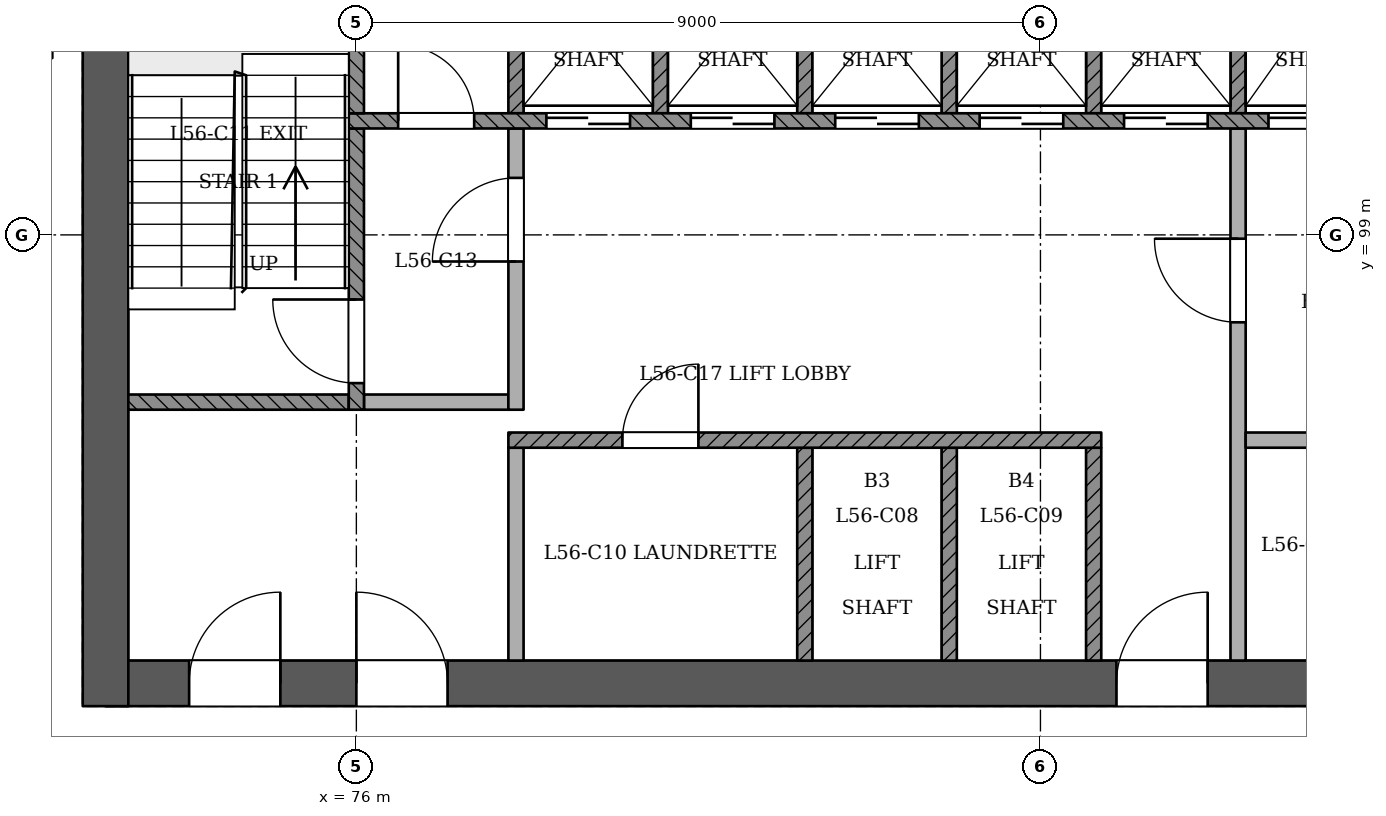
"""IFC4 building model, lengths in metres.
Left out: names, types, materials, properties, quantities, classifications, styles, units other than length and angle.
Written with IfcOpenShell. Run it as: python <this file> out.ifc"""

import sys

from ifc_helpers import new_model, si_unit, direction, frame, frame_2d, origin, place, context, subcontext, project, spatial, rectangle, extrude, element, fill, save


model = new_model("IFC4")
c1 = context("Model", 3, precision=1e-05, world=origin(), true_north=direction((0.0, 1.0)))
c2 = subcontext(c1, "Body", "Model", "MODEL_VIEW")
j1 = project(units=[si_unit("LENGTHUNIT", "METRE"), si_unit("PLANEANGLEUNIT", "RADIAN")], contexts=[c1])
p1 = place(None, origin())
s1 = spatial("IfcSite", under=j1, at=p1, CompositionType="ELEMENT")
p2 = place(p1, origin())
s2 = spatial("IfcBuilding", under=s1, at=p2, CompositionType="ELEMENT")
p3 = place(p2, frame((0.0, 0.0, 219.4)))
s3 = spatial("IfcBuildingStorey", under=s2, at=p3, CompositionType="ELEMENT", Elevation=219.4)
p4 = place(p3, frame((72.7, 93.1, 0.0), z_axis=(0.0, 0.0, 1.0), x_axis=(1.0, 0.0, 0.0)))
e1 = element("IfcWall", 1, at=p4, inside=s3, PredefinedType="SHEAR", context=c2, shape_type="SweptSolid", body=[
    extrude(rectangle(XDim=24.9, YDim=0.6, at=frame_2d((12.45, 0.0))), origin(), (0.0, 0.0, 1.0), 3.6),
])
p5 = place(p4, frame((1.1, 0.0, 0.0)))
e2 = element("IfcOpeningElement", 2, at=p5, cuts=e1, PredefinedType="OPENING", context=c2, shape_type="SweptSolid", body=[
    extrude(rectangle(XDim=1.2, YDim=2.1, at=frame_2d((0.6, 1.05))), frame((0.0, 0.311, 0.0), z_axis=(0.0, -1.0, 0.0), x_axis=(1.0, 0.0, 0.0)), (0.0, 0.0, 1.0), 0.621),
])
p6 = place(p4, frame((3.3, 0.0, 0.0)))
e3 = element("IfcOpeningElement", 3, at=p6, cuts=e1, PredefinedType="OPENING", context=c2, shape_type="SweptSolid", body=[
    extrude(rectangle(XDim=1.2, YDim=2.1, at=frame_2d((0.6, 1.05))), frame((0.0, 0.311, 0.0), z_axis=(0.0, -1.0, 0.0), x_axis=(1.0, 0.0, 0.0)), (0.0, 0.0, 1.0), 0.621),
])
p7 = place(p4, frame((13.3, 0.0, 0.0)))
e4 = element("IfcOpeningElement", 4, at=p7, cuts=e1, PredefinedType="OPENING", context=c2, shape_type="SweptSolid", body=[
    extrude(rectangle(XDim=1.2, YDim=2.1, at=frame_2d((0.6, 1.05))), frame((0.0, 0.311, 0.0), z_axis=(0.0, -1.0, 0.0), x_axis=(1.0, 0.0, 0.0)), (0.0, 0.0, 1.0), 0.621),
])
p8 = place(p4, frame((16.163, 0.0, 0.0)))
e5 = element("IfcOpeningElement", 5, at=p8, cuts=e1, PredefinedType="OPENING", context=c2, shape_type="SweptSolid", body=[
    extrude(rectangle(XDim=1.0, YDim=2.1, at=frame_2d((0.5, 1.05))), frame((0.0, 0.311, 0.0), z_axis=(0.0, -1.0, 0.0), x_axis=(1.0, 0.0, 0.0)), (0.0, 0.0, 1.0), 0.621),
])
p9 = place(p4, frame((19.6, 0.0, 0.0)))
e6 = element("IfcOpeningElement", 6, at=p9, cuts=e1, PredefinedType="OPENING", context=c2, shape_type="SweptSolid", body=[
    extrude(rectangle(XDim=1.0, YDim=2.1, at=frame_2d((0.5, 1.05))), frame((0.0, 0.311, 0.0), z_axis=(0.0, -1.0, 0.0), x_axis=(1.0, 0.0, 0.0)), (0.0, 0.0, 1.0), 0.621),
])
p10 = place(p4, frame((22.587, 0.0, 0.0)))
e7 = element("IfcOpeningElement", 7, at=p10, cuts=e1, PredefinedType="OPENING", context=c2, shape_type="SweptSolid", body=[
    extrude(rectangle(XDim=1.0, YDim=2.1, at=frame_2d((0.5, 1.05))), frame((0.0, 0.311, 0.0), z_axis=(0.0, -1.0, 0.0), x_axis=(1.0, 0.0, 0.0)), (0.0, 0.0, 1.0), 0.621),
])
p11 = place(p3, frame((72.7, 103.7, 0.0), z_axis=(0.0, 0.0, 1.0), x_axis=(0.0, -1.0, 0.0)))
e8 = element("IfcWall", 8, at=p11, inside=s3, PredefinedType="SHEAR", context=c2, shape_type="SweptSolid", body=[
    extrude(rectangle(XDim=10.9, YDim=0.6, at=frame_2d((5.45, 0.0))), origin(), (0.0, 0.0, 1.0), 3.6),
])
p12 = place(p3, frame((78.1, 93.4, 0.0), z_axis=(0.0, 0.0, 1.0), x_axis=(0.0, 1.0, 0.0)))
e9 = element("IfcWall", 9, at=p12, inside=s3, PredefinedType="PARTITIONING", context=c2, shape_type="SweptSolid", body=[
    extrude(rectangle(XDim=2.8, YDim=0.2, at=frame_2d((1.4, 0.0))), origin(), (0.0, 0.0, 1.0), 3.2),
])
for number, where, z_axis, x_axis in (
    (10, (81.9, 93.4, 0.0), (0.0, 0.0, 1.0), (0.0, 1.0, 0.0)),
    (11, (83.8, 93.4, 0.0), (0.0, 0.0, 1.0), (0.0, 1.0, 0.0)),
    (12, (85.7, 93.4, 0.0), (0.0, 0.0, 1.0), (0.0, 1.0, 0.0)),
):
    element("IfcWall", number, at=place(p3, frame(where, z_axis=z_axis, x_axis=x_axis)), inside=s3, PredefinedType="SOLIDWALL", context=c2, shape_type="SweptSolid", body=[
        extrude(rectangle(XDim=2.8, YDim=0.2, at=frame_2d((1.4, 0.0))), origin(), (0.0, 0.0, 1.0), 3.2),
    ])
p13 = place(p3, frame((87.6, 93.4, 0.0), z_axis=(0.0, 0.0, 1.0), x_axis=(0.0, 1.0, 0.0)))
e13 = element("IfcWall", 13, at=p13, inside=s3, PredefinedType="PARTITIONING", context=c2, shape_type="SweptSolid", body=[
    extrude(rectangle(XDim=7.0, YDim=0.2, at=frame_2d((3.5, 0.0))), origin(), (0.0, 0.0, 1.0), 3.2),
])
p14 = place(p13, frame((4.45, 0.0, 0.0)))
e14 = element("IfcOpeningElement", 14, at=p14, cuts=e13, PredefinedType="OPENING", context=c2, shape_type="SweptSolid", body=[
    extrude(rectangle(XDim=1.1, YDim=2.1, at=frame_2d((0.55, 1.05))), frame((0.0, 0.11, 0.0), z_axis=(0.0, -1.0, 0.0), x_axis=(1.0, 0.0, 0.0)), (0.0, 0.0, 1.0), 0.221),
])
p15 = place(p3, frame((78.0, 96.3, 0.0), z_axis=(0.0, 0.0, 1.0), x_axis=(1.0, 0.0, 0.0)))
e15 = element("IfcWall", 15, at=p15, inside=s3, PredefinedType="SOLIDWALL", context=c2, shape_type="SweptSolid", body=[
    extrude(rectangle(XDim=7.8, YDim=0.2, at=frame_2d((3.9, 0.0))), origin(), (0.0, 0.0, 1.0), 3.2),
])
p16 = place(p15, frame((1.5, 0.0, 0.0)))
e16 = element("IfcOpeningElement", 16, at=p16, cuts=e15, PredefinedType="OPENING", context=c2, shape_type="SweptSolid", body=[
    extrude(rectangle(XDim=1.0, YDim=2.1, at=frame_2d((0.5, 1.05))), frame((0.0, 0.11, 0.0), z_axis=(0.0, -1.0, 0.0), x_axis=(1.0, 0.0, 0.0)), (0.0, 0.0, 1.0), 0.221),
])
p17 = place(p3, frame((87.7, 96.3, 0.0), z_axis=(0.0, 0.0, 1.0), x_axis=(1.0, 0.0, 0.0)))
e17 = element("IfcWall", 17, at=p17, inside=s3, PredefinedType="PARTITIONING", context=c2, shape_type="SweptSolid", body=[
    extrude(rectangle(XDim=3.6, YDim=0.2, at=frame_2d((1.8, 0.0))), origin(), (0.0, 0.0, 1.0), 3.2),
])
p18 = place(p3, frame((73.0, 96.8, 0.0), z_axis=(0.0, 0.0, 1.0), x_axis=(1.0, 0.0, 0.0)))
e18 = element("IfcWall", 18, at=p18, inside=s3, PredefinedType="SOLIDWALL", context=c2, shape_type="SweptSolid", body=[
    extrude(rectangle(XDim=2.9, YDim=0.2, at=frame_2d((1.45, 0.0))), origin(), (0.0, 0.0, 1.0), 3.2),
])
p19 = place(p3, frame((76.0, 96.7, 0.0), z_axis=(0.0, 0.0, 1.0), x_axis=(0.0, 1.0, 0.0)))
e19 = element("IfcWall", 19, at=p19, inside=s3, PredefinedType="SOLIDWALL", context=c2, shape_type="SweptSolid", body=[
    extrude(rectangle(XDim=3.7, YDim=0.2, at=frame_2d((1.85, 0.0))), origin(), (0.0, 0.0, 1.0), 3.2),
])
p20 = place(p19, frame((0.35, 0.0, 0.0)))
e20 = element("IfcOpeningElement", 20, at=p20, cuts=e19, PredefinedType="OPENING", context=c2, shape_type="SweptSolid", body=[
    extrude(rectangle(XDim=1.1, YDim=2.1, at=frame_2d((0.55, 1.05))), frame((0.0, 0.11, 0.0), z_axis=(0.0, -1.0, 0.0), x_axis=(1.0, 0.0, 0.0)), (0.0, 0.0, 1.0), 0.221),
])
p21 = place(p3, frame((76.1, 96.8, 0.0), z_axis=(0.0, 0.0, 1.0), x_axis=(1.0, 0.0, 0.0)))
e21 = element("IfcWall", 21, at=p21, inside=s3, PredefinedType="PARTITIONING", context=c2, shape_type="SweptSolid", body=[
    extrude(rectangle(XDim=1.9, YDim=0.2, at=frame_2d((0.95, 0.0))), origin(), (0.0, 0.0, 1.0), 3.2),
])
p22 = place(p3, frame((78.1, 96.7, 0.0), z_axis=(0.0, 0.0, 1.0), x_axis=(0.0, 1.0, 0.0)))
e22 = element("IfcWall", 22, at=p22, inside=s3, PredefinedType="PARTITIONING", context=c2, shape_type="SweptSolid", body=[
    extrude(rectangle(XDim=3.7, YDim=0.2, at=frame_2d((1.85, 0.0))), origin(), (0.0, 0.0, 1.0), 3.2),
])
p23 = place(p22, frame((1.95, 0.0, 0.0)))
e23 = element("IfcOpeningElement", 23, at=p23, cuts=e22, PredefinedType="OPENING", context=c2, shape_type="SweptSolid", body=[
    extrude(rectangle(XDim=1.1, YDim=2.1, at=frame_2d((0.55, 1.05))), frame((0.0, 0.11, 0.0), z_axis=(0.0, -1.0, 0.0), x_axis=(1.0, 0.0, 0.0)), (0.0, 0.0, 1.0), 0.221),
])
p24 = place(p3, frame((75.9, 100.5, 0.0), z_axis=(0.0, 0.0, 1.0), x_axis=(1.0, 0.0, 0.0)))
e24 = element("IfcWall", 24, at=p24, inside=s3, PredefinedType="SOLIDWALL", context=c2, shape_type="SweptSolid", body=[
    extrude(rectangle(XDim=18.2, YDim=0.2, at=frame_2d((9.1, 0.0))), origin(), (0.0, 0.0, 1.0), 3.2),
])
p25 = place(p24, frame((2.6, 0.0, 0.0)))
e25 = element("IfcOpeningElement", 25, at=p25, cuts=e24, PredefinedType="OPENING", context=c2, shape_type="SweptSolid", body=[
    extrude(rectangle(XDim=1.1, YDim=2.1, at=frame_2d((0.55, 1.05))), frame((0.0, 0.11, 0.0), z_axis=(0.0, -1.0, 0.0), x_axis=(1.0, 0.0, 0.0)), (0.0, 0.0, 1.0), 0.221),
])
p26 = place(p24, frame((4.5, 0.0, 0.0)))
e26 = element("IfcOpeningElement", 26, at=p26, cuts=e24, PredefinedType="OPENING", context=c2, shape_type="SweptSolid", body=[
    extrude(rectangle(XDim=1.1, YDim=2.1, at=frame_2d((0.55, 1.05))), frame((0.0, 0.11, 0.0), z_axis=(0.0, -1.0, 0.0), x_axis=(1.0, 0.0, 0.0)), (0.0, 0.0, 1.0), 0.221),
])
p27 = place(p24, frame((6.4, 0.0, 0.0)))
e27 = element("IfcOpeningElement", 27, at=p27, cuts=e24, PredefinedType="OPENING", context=c2, shape_type="SweptSolid", body=[
    extrude(rectangle(XDim=1.1, YDim=2.1, at=frame_2d((0.55, 1.05))), frame((0.0, 0.11, 0.0), z_axis=(0.0, -1.0, 0.0), x_axis=(1.0, 0.0, 0.0)), (0.0, 0.0, 1.0), 0.221),
])
p28 = place(p24, frame((8.3, 0.0, 0.0)))
e28 = element("IfcOpeningElement", 28, at=p28, cuts=e24, PredefinedType="OPENING", context=c2, shape_type="SweptSolid", body=[
    extrude(rectangle(XDim=1.1, YDim=2.1, at=frame_2d((0.55, 1.05))), frame((0.0, 0.11, 0.0), z_axis=(0.0, -1.0, 0.0), x_axis=(1.0, 0.0, 0.0)), (0.0, 0.0, 1.0), 0.221),
])
p29 = place(p24, frame((10.2, 0.0, 0.0)))
e29 = element("IfcOpeningElement", 29, at=p29, cuts=e24, PredefinedType="OPENING", context=c2, shape_type="SweptSolid", body=[
    extrude(rectangle(XDim=1.1, YDim=2.1, at=frame_2d((0.55, 1.05))), frame((0.0, 0.11, 0.0), z_axis=(0.0, -1.0, 0.0), x_axis=(1.0, 0.0, 0.0)), (0.0, 0.0, 1.0), 0.221),
])
p30 = place(p24, frame((12.1, 0.0, 0.0)))
e30 = element("IfcOpeningElement", 30, at=p30, cuts=e24, PredefinedType="OPENING", context=c2, shape_type="SweptSolid", body=[
    extrude(rectangle(XDim=1.1, YDim=2.1, at=frame_2d((0.55, 1.05))), frame((0.0, 0.11, 0.0), z_axis=(0.0, -1.0, 0.0), x_axis=(1.0, 0.0, 0.0)), (0.0, 0.0, 1.0), 0.221),
])
p31 = place(p24, frame((14.0, 0.0, 0.0)))
e31 = element("IfcOpeningElement", 31, at=p31, cuts=e24, PredefinedType="OPENING", context=c2, shape_type="SweptSolid", body=[
    extrude(rectangle(XDim=1.1, YDim=2.1, at=frame_2d((0.55, 1.05))), frame((0.0, 0.11, 0.0), z_axis=(0.0, -1.0, 0.0), x_axis=(1.0, 0.0, 0.0)), (0.0, 0.0, 1.0), 0.221),
])
p32 = place(p24, frame((0.65, 0.0, 0.0)))
e32 = element("IfcOpeningElement", 32, at=p32, cuts=e24, PredefinedType="OPENING", context=c2, shape_type="SweptSolid", body=[
    extrude(rectangle(XDim=1.0, YDim=2.1, at=frame_2d((0.5, 1.05))), frame((0.0, 0.11, 0.0), z_axis=(0.0, -1.0, 0.0), x_axis=(1.0, 0.0, 0.0)), (0.0, 0.0, 1.0), 0.221),
])
p33 = place(p24, frame((16.3, 0.0, 0.0)))
e33 = element("IfcOpeningElement", 33, at=p33, cuts=e24, PredefinedType="OPENING", context=c2, shape_type="SweptSolid", body=[
    extrude(rectangle(XDim=1.0, YDim=2.1, at=frame_2d((0.5, 1.05))), frame((0.0, 0.11, 0.0), z_axis=(0.0, -1.0, 0.0), x_axis=(1.0, 0.0, 0.0)), (0.0, 0.0, 1.0), 0.221),
])
for number, where, z_axis, x_axis in (
    (34, (76.0, 100.6, 0.0), (0.0, 0.0, 1.0), (0.0, 1.0, 0.0)),
    (35, (78.1, 100.6, 0.0), (0.0, 0.0, 1.0), (0.0, 1.0, 0.0)),
    (36, (80.0, 100.6, 0.0), (0.0, 0.0, 1.0), (0.0, 1.0, 0.0)),
    (37, (81.9, 100.6, 0.0), (0.0, 0.0, 1.0), (0.0, 1.0, 0.0)),
    (38, (83.8, 100.6, 0.0), (0.0, 0.0, 1.0), (0.0, 1.0, 0.0)),
    (39, (85.7, 100.6, 0.0), (0.0, 0.0, 1.0), (0.0, 1.0, 0.0)),
    (40, (87.6, 100.6, 0.0), (0.0, 0.0, 1.0), (0.0, 1.0, 0.0)),
):
    element("IfcWall", number, at=place(p3, frame(where, z_axis=z_axis, x_axis=x_axis)), inside=s3, PredefinedType="SOLIDWALL", context=c2, shape_type="SweptSolid", body=[
        extrude(rectangle(XDim=2.8, YDim=0.2, at=frame_2d((1.4, 0.0))), origin(), (0.0, 0.0, 1.0), 3.2),
    ])
p34 = place(p25, origin())
e41 = element("IfcDoor", 41, at=p34, inside=s3, OperationType="SLIDING_TO_RIGHT", PredefinedType="NOTDEFINED", context=c2, shape_type="SweptSolid", body=[
    extrude(rectangle(XDim=1.1, YDim=2.1, at=frame_2d((0.55, 1.05))), frame((0.0, 0.025, 0.0), z_axis=(0.0, -1.0, 0.0), x_axis=(1.0, 0.0, 0.0)), (0.0, 0.0, 1.0), 0.05),
])
fill(e25, e41)
p35 = place(p26, origin())
e42 = element("IfcDoor", 42, at=p35, inside=s3, OperationType="SLIDING_TO_LEFT", PredefinedType="NOTDEFINED", context=c2, shape_type="SweptSolid", body=[
    extrude(rectangle(XDim=1.1, YDim=2.1, at=frame_2d((0.55, 1.05))), frame((0.0, 0.025, 0.0), z_axis=(0.0, -1.0, 0.0), x_axis=(1.0, 0.0, 0.0)), (0.0, 0.0, 1.0), 0.05),
])
fill(e26, e42)
p36 = place(p27, origin())
e43 = element("IfcDoor", 43, at=p36, inside=s3, OperationType="SLIDING_TO_RIGHT", PredefinedType="NOTDEFINED", context=c2, shape_type="SweptSolid", body=[
    extrude(rectangle(XDim=1.1, YDim=2.1, at=frame_2d((0.55, 1.05))), frame((0.0, 0.025, 0.0), z_axis=(0.0, -1.0, 0.0), x_axis=(1.0, 0.0, 0.0)), (0.0, 0.0, 1.0), 0.05),
])
fill(e27, e43)
p37 = place(p28, origin())
e44 = element("IfcDoor", 44, at=p37, inside=s3, OperationType="SLIDING_TO_LEFT", PredefinedType="NOTDEFINED", context=c2, shape_type="SweptSolid", body=[
    extrude(rectangle(XDim=1.1, YDim=2.1, at=frame_2d((0.55, 1.05))), frame((0.0, 0.025, 0.0), z_axis=(0.0, -1.0, 0.0), x_axis=(1.0, 0.0, 0.0)), (0.0, 0.0, 1.0), 0.05),
])
fill(e28, e44)
p38 = place(p29, origin())
e45 = element("IfcDoor", 45, at=p38, inside=s3, OperationType="SLIDING_TO_RIGHT", PredefinedType="NOTDEFINED", context=c2, shape_type="SweptSolid", body=[
    extrude(rectangle(XDim=1.1, YDim=2.1, at=frame_2d((0.55, 1.05))), frame((0.0, 0.025, 0.0), z_axis=(0.0, -1.0, 0.0), x_axis=(1.0, 0.0, 0.0)), (0.0, 0.0, 1.0), 0.05),
])
fill(e29, e45)
p39 = place(p30, origin())
e46 = element("IfcDoor", 46, at=p39, inside=s3, OperationType="SLIDING_TO_RIGHT", PredefinedType="NOTDEFINED", context=c2, shape_type="SweptSolid", body=[
    extrude(rectangle(XDim=1.1, YDim=2.1, at=frame_2d((0.55, 1.05))), frame((0.0, 0.025, 0.0), z_axis=(0.0, -1.0, 0.0), x_axis=(1.0, 0.0, 0.0)), (0.0, 0.0, 1.0), 0.05),
])
fill(e30, e46)
p40 = place(p20, origin())
e47 = element("IfcDoor", 47, at=p40, inside=s3, OperationType="SINGLE_SWING_RIGHT", PredefinedType="NOTDEFINED", context=c2, shape_type="SweptSolid", body=[
    extrude(rectangle(XDim=1.1, YDim=2.1, at=frame_2d((0.55, 1.05))), frame((0.0, 0.025, 0.0), z_axis=(0.0, -1.0, 0.0), x_axis=(1.0, 0.0, 0.0)), (0.0, 0.0, 1.0), 0.05),
])
fill(e20, e47)
p41 = place(p23, origin())
e48 = element("IfcDoor", 48, at=p41, inside=s3, OperationType="SINGLE_SWING_LEFT", PredefinedType="NOTDEFINED", context=c2, shape_type="SweptSolid", body=[
    extrude(rectangle(XDim=1.1, YDim=2.1, at=frame_2d((0.55, 1.05))), frame((0.0, 0.025, 0.0), z_axis=(0.0, -1.0, 0.0), x_axis=(1.0, 0.0, 0.0)), (0.0, 0.0, 1.0), 0.05),
])
fill(e23, e48)
p42 = place(p14, origin())
e49 = element("IfcDoor", 49, at=p42, inside=s3, OperationType="SINGLE_SWING_RIGHT", PredefinedType="NOTDEFINED", context=c2, shape_type="SweptSolid", body=[
    extrude(rectangle(XDim=1.1, YDim=2.1, at=frame_2d((0.55, 1.05))), frame((0.0, 0.025, 0.0), z_axis=(0.0, -1.0, 0.0), x_axis=(1.0, 0.0, 0.0)), (0.0, 0.0, 1.0), 0.05),
])
fill(e14, e49)
p43 = place(p5, origin())
e50 = element("IfcDoor", 50, at=p43, inside=s3, OperationType="SINGLE_SWING_RIGHT", PredefinedType="NOTDEFINED", context=c2, shape_type="SweptSolid", body=[
    extrude(rectangle(XDim=1.2, YDim=2.1, at=frame_2d((0.6, 1.05))), frame((0.0, 0.025, 0.0), z_axis=(0.0, -1.0, 0.0), x_axis=(1.0, 0.0, 0.0)), (0.0, 0.0, 1.0), 0.05),
])
fill(e2, e50)
p44 = place(p6, origin())
e51 = element("IfcDoor", 51, at=p44, inside=s3, OperationType="SINGLE_SWING_LEFT", PredefinedType="NOTDEFINED", context=c2, shape_type="SweptSolid", body=[
    extrude(rectangle(XDim=1.2, YDim=2.1, at=frame_2d((0.6, 1.05))), frame((0.0, 0.025, 0.0), z_axis=(0.0, -1.0, 0.0), x_axis=(1.0, 0.0, 0.0)), (0.0, 0.0, 1.0), 0.05),
])
fill(e3, e51)
p45 = place(p7, origin())
e52 = element("IfcDoor", 52, at=p45, inside=s3, OperationType="SINGLE_SWING_RIGHT", PredefinedType="NOTDEFINED", context=c2, shape_type="SweptSolid", body=[
    extrude(rectangle(XDim=1.2, YDim=2.1, at=frame_2d((0.6, 1.05))), frame((0.0, 0.025, 0.0), z_axis=(0.0, -1.0, 0.0), x_axis=(1.0, 0.0, 0.0)), (0.0, 0.0, 1.0), 0.05),
])
fill(e4, e52)
p46 = place(p32, origin())
e53 = element("IfcDoor", 53, at=p46, inside=s3, OperationType="SINGLE_SWING_LEFT", PredefinedType="NOTDEFINED", context=c2, shape_type="SweptSolid", body=[
    extrude(rectangle(XDim=1.0, YDim=2.1, at=frame_2d((0.5, 1.05))), frame((0.0, 0.025, 0.0), z_axis=(0.0, -1.0, 0.0), x_axis=(1.0, 0.0, 0.0)), (0.0, 0.0, 1.0), 0.05),
])
fill(e32, e53)
p47 = place(p16, origin())
e54 = element("IfcDoor", 54, at=p47, inside=s3, OperationType="SINGLE_SWING_RIGHT", PredefinedType="NOTDEFINED", context=c2, shape_type="SweptSolid", body=[
    extrude(rectangle(XDim=1.0, YDim=2.1, at=frame_2d((0.5, 1.05))), frame((0.0, 0.025, 0.0), z_axis=(0.0, -1.0, 0.0), x_axis=(1.0, 0.0, 0.0)), (0.0, 0.0, 1.0), 0.05),
])
fill(e16, e54)
save(model, sys.argv[1])
